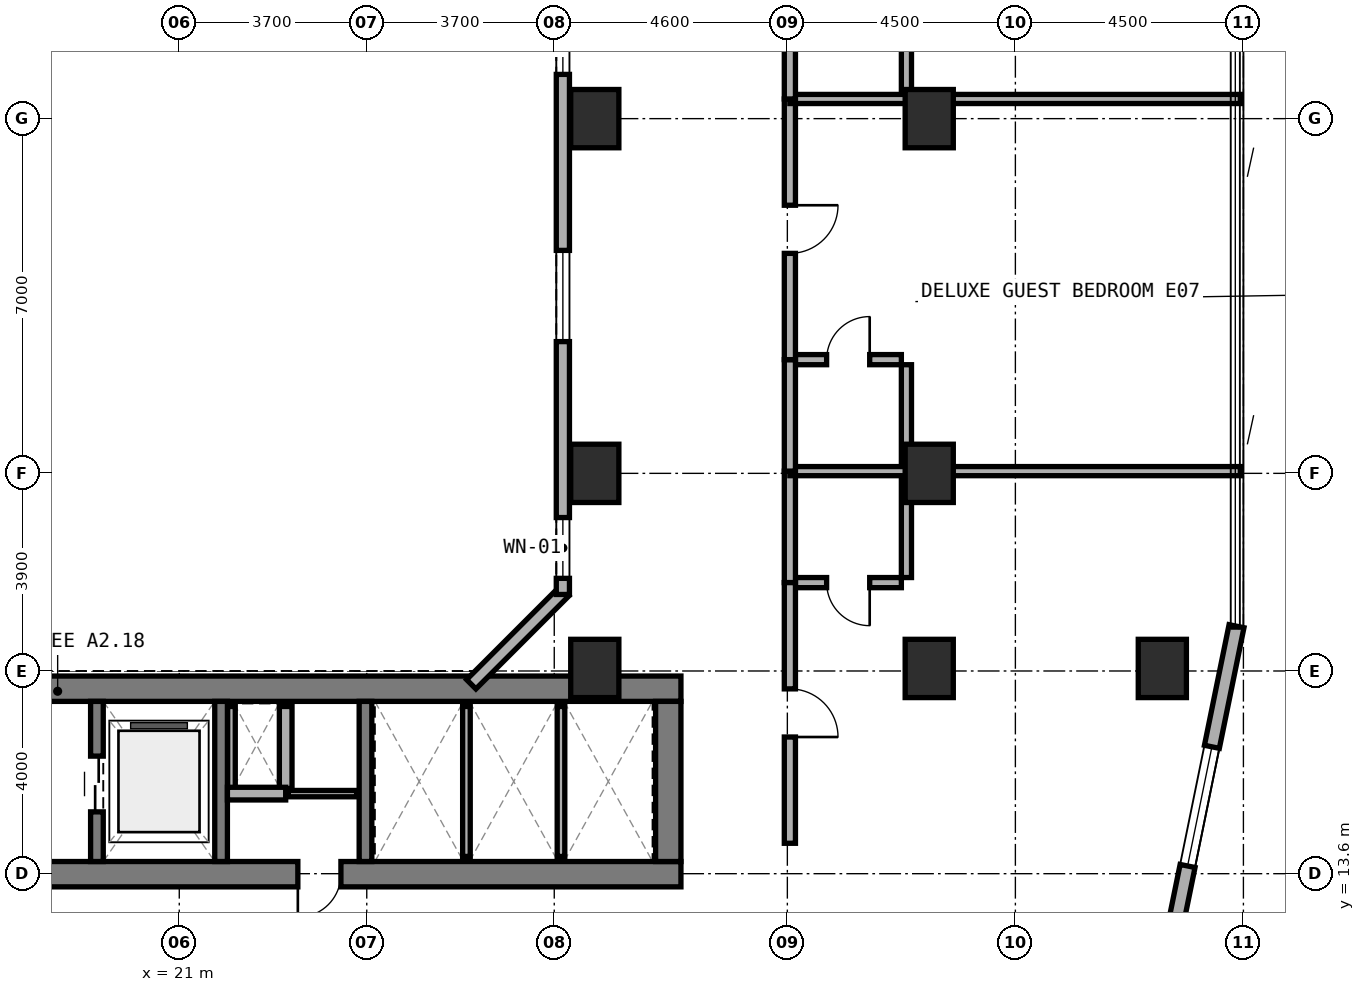
"""IFC4 building model, lengths in metres.
Left out: names, types, materials, properties, quantities, classifications, styles, units other than length and angle.
Written with IfcOpenShell. Run it as: python <this file> out.ifc"""

import sys

from ifc_helpers import new_model, si_unit, direction, frame, frame_2d, origin, origin_2d, place, context, subcontext, project, spatial, rectangle, extrude, element, fill, save


model = new_model("IFC4")
c1 = context("Model", 3, precision=1e-05, world=origin(), true_north=direction((0.0, 1.0)))
c2 = subcontext(c1, "Body", "Model", "MODEL_VIEW")
j1 = project(units=[si_unit("LENGTHUNIT", "METRE"), si_unit("PLANEANGLEUNIT", "RADIAN")], contexts=[c1])
p1 = place(None, origin())
s1 = spatial("IfcSite", under=j1, at=p1, CompositionType="ELEMENT")
p2 = place(p1, origin())
s2 = spatial("IfcBuilding", under=s1, at=p2, CompositionType="ELEMENT")
p3 = place(p2, frame((0.0, 0.0, 73.0)))
s3 = spatial("IfcBuildingStorey", under=s2, at=p3, CompositionType="ELEMENT", Elevation=73.0)
p4 = place(p3, frame((6.3, 13.59, 0.0), z_axis=(0.0, 0.0, 1.0), x_axis=(1.0, 0.0, 0.0)))
e1 = element("IfcWall", 1, at=p4, inside=s3, PredefinedType="SHEAR", context=c2, shape_type="SweptSolid", body=[
    extrude(rectangle(XDim=24.6, YDim=0.5, at=frame_2d((12.3, 0.0))), origin(), (0.0, 0.0, 1.0), 3.5),
])
p5 = place(p4, frame((9.25, 0.0, 0.0)))
e2 = element("IfcOpeningElement", 2, at=p5, cuts=e1, PredefinedType="OPENING", context=c2, shape_type="SweptSolid", body=[
    extrude(rectangle(XDim=1.2, YDim=2.15, at=frame_2d((0.6, 1.075))), frame((0.0, 0.26, 0.0), z_axis=(0.0, -1.0, 0.0), x_axis=(1.0, 0.0, 0.0)), (0.0, 0.0, 1.0), 0.52),
])
p6 = place(p4, frame((17.04, 0.0, 0.0)))
e3 = element("IfcOpeningElement", 3, at=p6, cuts=e1, PredefinedType="OPENING", context=c2, shape_type="SweptSolid", body=[
    extrude(rectangle(XDim=0.85, YDim=2.1, at=frame_2d((0.425, 1.05))), frame((0.0, 0.26, 0.0), z_axis=(0.0, -1.0, 0.0), x_axis=(1.0, 0.0, 0.0)), (0.0, 0.0, 1.0), 0.52),
])
p7 = place(p3, frame((6.3, 17.25, 0.0), z_axis=(0.0, 0.0, 1.0), x_axis=(1.0, 0.0, 0.0)))
e4 = element("IfcWall", 4, at=p7, inside=s3, PredefinedType="SHEAR", context=c2, shape_type="SweptSolid", body=[
    extrude(rectangle(XDim=24.6, YDim=0.5, at=frame_2d((12.3, 0.0))), origin(), (0.0, 0.0, 1.0), 3.5),
])
p8 = place(p3, frame((30.65, 13.84, 0.0), z_axis=(0.0, 0.0, 1.0), x_axis=(0.0, 1.0, 0.0)))
e5 = element("IfcWall", 5, at=p8, inside=s3, PredefinedType="SHEAR", context=c2, shape_type="SweptSolid", body=[
    extrude(rectangle(XDim=3.16, YDim=0.5, at=frame_2d((1.58, 0.0))), origin(), (0.0, 0.0, 1.0), 3.5),
])
p9 = place(p3, frame((19.375, 13.84, 0.0), z_axis=(0.0, 0.0, 1.0), x_axis=(0.0, 1.0, 0.0)))
e6 = element("IfcWall", 6, at=p9, inside=s3, PredefinedType="STANDARD", context=c2, shape_type="SweptSolid", body=[
    extrude(rectangle(XDim=3.16, YDim=0.25, at=frame_2d((1.58, 0.0))), origin(), (0.0, 0.0, 1.0), 3.22),
])
p10 = place(p9, frame((0.98, 0.0, 0.0)))
e7 = element("IfcOpeningElement", 7, at=p10, cuts=e6, PredefinedType="OPENING", context=c2, shape_type="SweptSolid", body=[
    extrude(rectangle(XDim=1.1, YDim=2.15, at=frame_2d((0.55, 1.075))), frame((0.0, 0.135, 0.0), z_axis=(0.0, -1.0, 0.0), x_axis=(1.0, 0.0, 0.0)), (0.0, 0.0, 1.0), 0.27),
])
for number, where, z_axis, x_axis in (
    (8, (21.825, 13.84, 0.0), (0.0, 0.0, 1.0), (0.0, 1.0, 0.0)),
    (9, (24.675, 13.84, 0.0), (0.0, 0.0, 1.0), (0.0, 1.0, 0.0)),
):
    element("IfcWall", number, at=place(p3, frame(where, z_axis=z_axis, x_axis=x_axis)), inside=s3, PredefinedType="STANDARD", context=c2, shape_type="SweptSolid", body=[
        extrude(rectangle(XDim=3.16, YDim=0.25, at=frame_2d((1.58, 0.0))), origin(), (0.0, 0.0, 1.0), 3.22),
    ])
for number, where, z_axis, x_axis in (
    (10, (35.8, 21.5, 0.0), (0.0, 0.0, 1.0), (1.0, 0.0, 0.0)),
    (11, (35.8, 28.5, 0.0), (0.0, 0.0, 1.0), (1.0, 0.0, 0.0)),
    (12, (35.8, 17.65, 0.0), (0.0, 0.0, 1.0), (1.0, 0.0, 0.0)),
    (13, (29.2, 17.65, 0.0), (0.0, 0.0, 1.0), (1.0, 0.0, 0.0)),
    (14, (29.2, 21.5, 0.0), (0.0, 0.0, 1.0), (1.0, 0.0, 0.0)),
    (15, (29.2, 28.5, 0.0), (0.0, 0.0, 1.0), (1.0, 0.0, 0.0)),
    (16, (40.4, 17.65, 0.0), (0.0, 0.0, 1.0), (1.0, 0.0, 0.0)),
):
    element("IfcColumn", number, at=place(p3, frame(where, z_axis=z_axis, x_axis=x_axis)), inside=s3, PredefinedType="COLUMN", context=c2, shape_type="SweptSolid", body=[
        extrude(rectangle(XDim=0.95, YDim=1.15, at=origin_2d()), origin(), (0.0, 0.0, 1.0), 3.5),
    ])
p11 = place(p3, frame((39.851, 8.622, 0.0), z_axis=(0.0, 0.0, 1.0), x_axis=(0.199990901713, 0.979797754249, 0.0)))
e17 = element("IfcWall", 17, at=p11, inside=s3, PredefinedType="STANDARD", context=c2, shape_type="SweptSolid", body=[
    extrude(rectangle(XDim=10.065, YDim=0.3, at=frame_2d((5.033, 0.0))), origin(), (0.0, 0.0, 1.0), 3.22),
])
p12 = place(p11, frame((0.378, 0.0, 0.85)))
e18 = element("IfcOpeningElement", 18, at=p12, cuts=e17, PredefinedType="OPENING", context=c2, shape_type="SweptSolid", body=[
    extrude(rectangle(XDim=1.8, YDim=1.5, at=frame_2d((0.9, 0.75))), frame((0.0, 0.16, 0.0), z_axis=(0.0, -1.0, 0.0), x_axis=(1.0, 0.0, 0.0)), (0.0, 0.0, 1.0), 0.32),
])
p13 = place(p11, frame((5.236, 0.0, 0.8)))
e19 = element("IfcOpeningElement", 19, at=p13, cuts=e17, PredefinedType="OPENING", context=c2, shape_type="SweptSolid", body=[
    extrude(rectangle(XDim=2.4, YDim=1.6, at=frame_2d((1.2, 0.8))), frame((0.0, 0.16, 0.0), z_axis=(0.0, -1.0, 0.0), x_axis=(1.0, 0.0, 0.0)), (0.0, 0.0, 1.0), 0.32),
])
p14 = place(p3, frame((26.762, 17.338, 0.0), z_axis=(0.0, 0.0, 1.0), x_axis=(0.707059717605, 0.707153841636, 0.0)))
e20 = element("IfcWall", 20, at=p14, inside=s3, PredefinedType="STANDARD", context=c2, shape_type="SweptSolid", body=[
    extrude(rectangle(XDim=2.594, YDim=0.26, at=frame_2d((1.297, 0.0))), origin(), (0.0, 0.0, 1.0), 3.22),
])
p15 = place(p3, frame((28.57, 19.11, 0.0), z_axis=(0.0, 0.0, 1.0), x_axis=(0.0, 1.0, 0.0)))
e21 = element("IfcWall", 21, at=p15, inside=s3, PredefinedType="STANDARD", context=c2, shape_type="SweptSolid", body=[
    extrude(rectangle(XDim=11.78, YDim=0.26, at=frame_2d((5.89, 0.0))), origin(), (0.0, 0.0, 1.0), 3.22),
])
p16 = place(p15, frame((0.318, 0.0, 0.85)))
e22 = element("IfcOpeningElement", 22, at=p16, cuts=e21, PredefinedType="OPENING", context=c2, shape_type="SweptSolid", body=[
    extrude(rectangle(XDim=1.2, YDim=1.5, at=frame_2d((0.6, 0.75))), frame((0.0, 0.14, 0.0), z_axis=(0.0, -1.0, 0.0), x_axis=(1.0, 0.0, 0.0)), (0.0, 0.0, 1.0), 0.28),
])
p17 = place(p15, frame((4.99, 0.0, 0.85)))
e23 = element("IfcOpeningElement", 23, at=p17, cuts=e21, PredefinedType="OPENING", context=c2, shape_type="SweptSolid", body=[
    extrude(rectangle(XDim=1.8, YDim=1.5, at=frame_2d((0.9, 0.75))), frame((0.0, 0.14, 0.0), z_axis=(0.0, -1.0, 0.0), x_axis=(1.0, 0.0, 0.0)), (0.0, 0.0, 1.0), 0.28),
])
p18 = place(p15, frame((10.263, 0.0, 0.85)))
e24 = element("IfcOpeningElement", 24, at=p18, cuts=e21, PredefinedType="OPENING", context=c2, shape_type="SweptSolid", body=[
    extrude(rectangle(XDim=1.2, YDim=1.5, at=frame_2d((0.6, 0.75))), frame((0.0, 0.14, 0.0), z_axis=(0.0, -1.0, 0.0), x_axis=(1.0, 0.0, 0.0)), (0.0, 0.0, 1.0), 0.28),
])
p19 = place(p3, frame((22.03, 15.28, 0.0), z_axis=(0.0, 0.0, 1.0), x_axis=(0.0, 1.0, 0.0)))
e25 = element("IfcWall", 25, at=p19, inside=s3, PredefinedType="PARTITIONING", context=c2, shape_type="SweptSolid", body=[
    extrude(rectangle(XDim=1.62, YDim=0.15, at=frame_2d((0.81, 0.0))), origin(), (0.0, 0.0, 1.0), 3.22),
])
p20 = place(p3, frame((23.1, 15.28, 0.0), z_axis=(0.0, 0.0, 1.0), x_axis=(0.0, 1.0, 0.0)))
e26 = element("IfcWall", 26, at=p20, inside=s3, PredefinedType="SOLIDWALL", context=c2, shape_type="SweptSolid", body=[
    extrude(rectangle(XDim=1.62, YDim=0.25, at=frame_2d((0.81, 0.0))), origin(), (0.0, 0.0, 1.0), 3.22),
])
p21 = place(p3, frame((21.95, 15.18, 0.0), z_axis=(0.0, 0.0, 1.0), x_axis=(1.0, 0.0, 0.0)))
e27 = element("IfcWall", 27, at=p21, inside=s3, PredefinedType="SOLIDWALL", context=c2, shape_type="SweptSolid", body=[
    extrude(rectangle(XDim=1.15, YDim=0.25, at=frame_2d((0.575, 0.0))), origin(), (0.0, 0.0, 1.0), 3.22),
])
p22 = place(p3, frame((23.15, 15.18, 0.0), z_axis=(0.0, 0.0, 1.0), x_axis=(1.0, 0.0, 0.0)))
e28 = element("IfcWall", 28, at=p22, inside=s3, PredefinedType="PARTITIONING", context=c2, shape_type="SweptSolid", body=[
    extrude(rectangle(XDim=1.35, YDim=0.125, at=frame_2d((0.675, 0.0))), origin(), (0.0, 0.0, 1.0), 3.22),
])
p23 = place(p3, frame((26.667, 13.94, 0.0), z_axis=(0.0, 0.0, 1.0), x_axis=(0.0, 1.0, 0.0)))
e29 = element("IfcWall", 29, at=p23, inside=s3, PredefinedType="PARTITIONING", context=c2, shape_type="SweptSolid", body=[
    extrude(rectangle(XDim=2.96, YDim=0.15, at=frame_2d((1.48, 0.0))), origin(), (0.0, 0.0, 1.0), 3.22),
])
p24 = place(p3, frame((28.533, 13.94, 0.0), z_axis=(0.0, 0.0, 1.0), x_axis=(0.0, 1.0, 0.0)))
e30 = element("IfcWall", 30, at=p24, inside=s3, PredefinedType="PARTITIONING", context=c2, shape_type="SweptSolid", body=[
    extrude(rectangle(XDim=2.96, YDim=0.15, at=frame_2d((1.48, 0.0))), origin(), (0.0, 0.0, 1.0), 2.495),
])
p25 = place(p3, frame((33.15, 19.344, 0.0), z_axis=(0.0, 0.0, 1.0), x_axis=(1.0, 0.0, 0.0)))
e31 = element("IfcWall", 31, at=p25, inside=s3, PredefinedType="PLUMBINGWALL", context=c2, shape_type="SweptSolid", body=[
    extrude(rectangle(XDim=2.1, YDim=0.2, at=frame_2d((1.05, 0.0))), origin(), (0.0, 0.0, 1.0), 3.22),
])
p26 = place(p25, frame((0.625, 0.0, 0.0)))
e32 = element("IfcOpeningElement", 32, at=p26, cuts=e31, PredefinedType="OPENING", context=c2, shape_type="SweptSolid", body=[
    extrude(rectangle(XDim=0.85, YDim=2.1, at=frame_2d((0.425, 1.05))), frame((0.0, 0.11, 0.0), z_axis=(0.0, -1.0, 0.0), x_axis=(1.0, 0.0, 0.0)), (0.0, 0.0, 1.0), 0.22),
])
p27 = place(p3, frame((35.35, 19.444, 0.0), z_axis=(0.0, 0.0, 1.0), x_axis=(0.0, 1.0, 0.0)))
e33 = element("IfcWall", 33, at=p27, inside=s3, PredefinedType="PLUMBINGWALL", context=c2, shape_type="SweptSolid", body=[
    extrude(rectangle(XDim=2.0, YDim=0.2, at=frame_2d((1.0, 0.0))), origin(), (0.0, 0.0, 1.0), 2.495),
])
p28 = place(p3, frame((33.05, 19.344, 0.0), z_axis=(0.0, 0.0, 1.0), x_axis=(0.0, 1.0, 0.0)))
e34 = element("IfcWall", 34, at=p28, inside=s3, PredefinedType="SOLIDWALL", context=c2, shape_type="SweptSolid", body=[
    extrude(rectangle(XDim=2.2, YDim=0.22, at=frame_2d((1.1, 0.0))), origin(), (0.0, 0.0, 1.0), 2.495),
])
p29 = place(p3, frame((33.05, 14.2, 0.0), z_axis=(0.0, 0.0, 1.0), x_axis=(0.0, 1.0, 0.0)))
e35 = element("IfcWall", 35, at=p29, inside=s3, PredefinedType="SOLIDWALL", context=c2, shape_type="SweptSolid", body=[
    extrude(rectangle(XDim=5.144, YDim=0.22, at=frame_2d((2.572, 0.0))), origin(), (0.0, 0.0, 1.0), 2.495),
])
p30 = place(p29, frame((2.097, 0.0, 0.0)))
e36 = element("IfcOpeningElement", 36, at=p30, cuts=e35, PredefinedType="OPENING", context=c2, shape_type="SweptSolid", body=[
    extrude(rectangle(XDim=0.95, YDim=2.1, at=frame_2d((0.475, 1.05))), frame((0.0, 0.12, 0.0), z_axis=(0.0, -1.0, 0.0), x_axis=(1.0, 0.0, 0.0)), (0.0, 0.0, 1.0), 0.24),
])
p31 = place(p3, frame((33.05, 21.544, 0.0), z_axis=(0.0, 0.0, 1.0), x_axis=(1.0, 0.0, 0.0)))
e37 = element("IfcWall", 37, at=p31, inside=s3, PredefinedType="SOLIDWALL", context=c2, shape_type="SweptSolid", body=[
    extrude(rectangle(XDim=8.89, YDim=0.18, at=frame_2d((4.445, 0.0))), origin(), (0.0, 0.0, 1.0), 2.495),
])
p32 = place(p3, frame((33.15, 23.744, 0.0), z_axis=(0.0, 0.0, 1.0), x_axis=(1.0, 0.0, 0.0)))
e38 = element("IfcWall", 38, at=p32, inside=s3, PredefinedType="PLUMBINGWALL", context=c2, shape_type="SweptSolid", body=[
    extrude(rectangle(XDim=2.1, YDim=0.2, at=frame_2d((1.05, 0.0))), origin(), (0.0, 0.0, 1.0), 3.22),
])
p33 = place(p32, frame((0.625, 0.0, 0.0)))
e39 = element("IfcOpeningElement", 39, at=p33, cuts=e38, PredefinedType="OPENING", context=c2, shape_type="SweptSolid", body=[
    extrude(rectangle(XDim=0.85, YDim=2.1, at=frame_2d((0.425, 1.05))), frame((0.0, 0.11, 0.0), z_axis=(0.0, -1.0, 0.0), x_axis=(1.0, 0.0, 0.0)), (0.0, 0.0, 1.0), 0.22),
])
p34 = place(p3, frame((35.35, 21.644, 0.0), z_axis=(0.0, 0.0, 1.0), x_axis=(0.0, 1.0, 0.0)))
e40 = element("IfcWall", 40, at=p34, inside=s3, PredefinedType="PLUMBINGWALL", context=c2, shape_type="SweptSolid", body=[
    extrude(rectangle(XDim=2.0, YDim=0.2, at=frame_2d((1.0, 0.0))), origin(), (0.0, 0.0, 1.0), 3.22),
])
p35 = place(p3, frame((33.05, 21.544, 0.0), z_axis=(0.0, 0.0, 1.0), x_axis=(0.0, 1.0, 0.0)))
e41 = element("IfcWall", 41, at=p35, inside=s3, PredefinedType="SOLIDWALL", context=c2, shape_type="SweptSolid", body=[
    extrude(rectangle(XDim=2.2, YDim=0.22, at=frame_2d((1.1, 0.0))), origin(), (0.0, 0.0, 1.0), 2.495),
])
p36 = place(p3, frame((33.05, 23.744, 0.0), z_axis=(0.0, 0.0, 1.0), x_axis=(0.0, 1.0, 0.0)))
e42 = element("IfcWall", 42, at=p36, inside=s3, PredefinedType="SOLIDWALL", context=c2, shape_type="SweptSolid", body=[
    extrude(rectangle(XDim=5.144, YDim=0.22, at=frame_2d((2.572, 0.0))), origin(), (0.0, 0.0, 1.0), 2.495),
])
p37 = place(p36, frame((2.097, 0.0, 0.0)))
e43 = element("IfcOpeningElement", 43, at=p37, cuts=e42, PredefinedType="OPENING", context=c2, shape_type="SweptSolid", body=[
    extrude(rectangle(XDim=0.95, YDim=2.1, at=frame_2d((0.475, 1.05))), frame((0.0, 0.12, 0.0), z_axis=(0.0, -1.0, 0.0), x_axis=(1.0, 0.0, 0.0)), (0.0, 0.0, 1.0), 0.24),
])
p38 = place(p3, frame((33.05, 28.888, 0.0), z_axis=(0.0, 0.0, 1.0), x_axis=(1.0, 0.0, 0.0)))
e44 = element("IfcWall", 44, at=p38, inside=s3, PredefinedType="SOLIDWALL", context=c2, shape_type="SweptSolid", body=[
    extrude(rectangle(XDim=8.89, YDim=0.18, at=frame_2d((4.445, 0.0))), origin(), (0.0, 0.0, 1.0), 2.745),
])
p39 = place(p3, frame((35.35, 28.988, 0.0), z_axis=(0.0, 0.0, 1.0), x_axis=(0.0, 1.0, 0.0)))
e45 = element("IfcWall", 45, at=p39, inside=s3, PredefinedType="PLUMBINGWALL", context=c2, shape_type="SweptSolid", body=[
    extrude(rectangle(XDim=2.0, YDim=0.2, at=frame_2d((1.0, 0.0))), origin(), (0.0, 0.0, 1.0), 3.22),
])
p40 = place(p3, frame((33.05, 28.888, 0.0), z_axis=(0.0, 0.0, 1.0), x_axis=(0.0, 1.0, 0.0)))
e46 = element("IfcWall", 46, at=p40, inside=s3, PredefinedType="SOLIDWALL", context=c2, shape_type="SweptSolid", body=[
    extrude(rectangle(XDim=2.2, YDim=0.22, at=frame_2d((1.1, 0.0))), origin(), (0.0, 0.0, 1.0), 3.22),
])
p41 = place(p13, origin())
e47 = element("IfcWindow", 47, at=p41, inside=s3, PartitioningType="SINGLE_PANEL", PredefinedType="WINDOW", context=c2, shape_type="SweptSolid", body=[
    extrude(rectangle(XDim=2.4, YDim=1.6, at=frame_2d((1.2, 0.8))), frame((0.0, 0.03, 0.0), z_axis=(0.0, -1.0, 0.0), x_axis=(1.0, 0.0, 0.0)), (0.0, 0.0, 1.0), 0.06),
])
fill(e19, e47)
p42 = place(p16, origin())
e48 = element("IfcWindow", 48, at=p42, inside=s3, PartitioningType="SINGLE_PANEL", PredefinedType="WINDOW", context=c2, shape_type="SweptSolid", body=[
    extrude(rectangle(XDim=1.2, YDim=1.5, at=frame_2d((0.6, 0.75))), frame((0.0, 0.03, 0.0), z_axis=(0.0, -1.0, 0.0), x_axis=(1.0, 0.0, 0.0)), (0.0, 0.0, 1.0), 0.06),
])
fill(e22, e48)
p43 = place(p17, origin())
e49 = element("IfcWindow", 49, at=p43, inside=s3, PartitioningType="SINGLE_PANEL", PredefinedType="WINDOW", context=c2, shape_type="SweptSolid", body=[
    extrude(rectangle(XDim=1.8, YDim=1.5, at=frame_2d((0.9, 0.75))), frame((0.0, 0.03, 0.0), z_axis=(0.0, -1.0, 0.0), x_axis=(1.0, 0.0, 0.0)), (0.0, 0.0, 1.0), 0.06),
])
fill(e23, e49)
p44 = place(p18, origin())
e50 = element("IfcWindow", 50, at=p44, inside=s3, PartitioningType="SINGLE_PANEL", PredefinedType="WINDOW", context=c2, shape_type="SweptSolid", body=[
    extrude(rectangle(XDim=1.2, YDim=1.5, at=frame_2d((0.6, 0.75))), frame((0.0, 0.03, 0.0), z_axis=(0.0, -1.0, 0.0), x_axis=(1.0, 0.0, 0.0)), (0.0, 0.0, 1.0), 0.06),
])
fill(e24, e50)
p45 = place(p10, origin())
e51 = element("IfcDoor", 51, at=p45, inside=s3, OperationType="DOUBLE_DOOR_SLIDING", PredefinedType="DOOR", context=c2, shape_type="SweptSolid", body=[
    extrude(rectangle(XDim=1.1, YDim=2.15, at=frame_2d((0.55, 1.075))), frame((0.0, 0.025, 0.0), z_axis=(0.0, -1.0, 0.0), x_axis=(1.0, 0.0, 0.0)), (0.0, 0.0, 1.0), 0.05),
])
fill(e7, e51)
p46 = place(p6, frame((0.85, 0.0, 0.0), z_axis=(0.0, 0.0, 1.0), x_axis=(-1.0, 0.0, 0.0)))
e52 = element("IfcDoor", 52, at=p46, inside=s3, OperationType="SINGLE_SWING_RIGHT", PredefinedType="DOOR", context=c2, shape_type="SweptSolid", body=[
    extrude(rectangle(XDim=0.85, YDim=2.1, at=frame_2d((0.425, 1.05))), frame((0.0, 0.025, 0.0), z_axis=(0.0, -1.0, 0.0), x_axis=(1.0, 0.0, 0.0)), (0.0, 0.0, 1.0), 0.05),
])
fill(e3, e52)
p47 = place(p26, frame((0.85, 0.0, 0.0), z_axis=(0.0, 0.0, 1.0), x_axis=(-1.0, 0.0, 0.0)))
e53 = element("IfcDoor", 53, at=p47, inside=s3, OperationType="SINGLE_SWING_LEFT", PredefinedType="DOOR", context=c2, shape_type="SweptSolid", body=[
    extrude(rectangle(XDim=0.85, YDim=2.1, at=frame_2d((0.425, 1.05))), frame((0.0, 0.025, 0.0), z_axis=(0.0, -1.0, 0.0), x_axis=(1.0, 0.0, 0.0)), (0.0, 0.0, 1.0), 0.05),
])
fill(e32, e53)
p48 = place(p30, frame((0.95, 0.0, 0.0), z_axis=(0.0, 0.0, 1.0), x_axis=(-1.0, 0.0, 0.0)))
e54 = element("IfcDoor", 54, at=p48, inside=s3, OperationType="SINGLE_SWING_RIGHT", PredefinedType="DOOR", context=c2, shape_type="SweptSolid", body=[
    extrude(rectangle(XDim=0.95, YDim=2.1, at=frame_2d((0.475, 1.05))), frame((0.0, 0.025, 0.0), z_axis=(0.0, -1.0, 0.0), x_axis=(1.0, 0.0, 0.0)), (0.0, 0.0, 1.0), 0.05),
])
fill(e36, e54)
p49 = place(p33, origin())
e55 = element("IfcDoor", 55, at=p49, inside=s3, OperationType="SINGLE_SWING_RIGHT", PredefinedType="DOOR", context=c2, shape_type="SweptSolid", body=[
    extrude(rectangle(XDim=0.85, YDim=2.1, at=frame_2d((0.425, 1.05))), frame((0.0, 0.025, 0.0), z_axis=(0.0, -1.0, 0.0), x_axis=(1.0, 0.0, 0.0)), (0.0, 0.0, 1.0), 0.05),
])
fill(e39, e55)
p50 = place(p37, frame((0.95, 0.0, 0.0), z_axis=(0.0, 0.0, 1.0), x_axis=(-1.0, 0.0, 0.0)))
e56 = element("IfcDoor", 56, at=p50, inside=s3, OperationType="SINGLE_SWING_LEFT", PredefinedType="DOOR", context=c2, shape_type="SweptSolid", body=[
    extrude(rectangle(XDim=0.95, YDim=2.1, at=frame_2d((0.475, 1.05))), frame((0.0, 0.025, 0.0), z_axis=(0.0, -1.0, 0.0), x_axis=(1.0, 0.0, 0.0)), (0.0, 0.0, 1.0), 0.05),
])
fill(e43, e56)
save(model, sys.argv[1])
